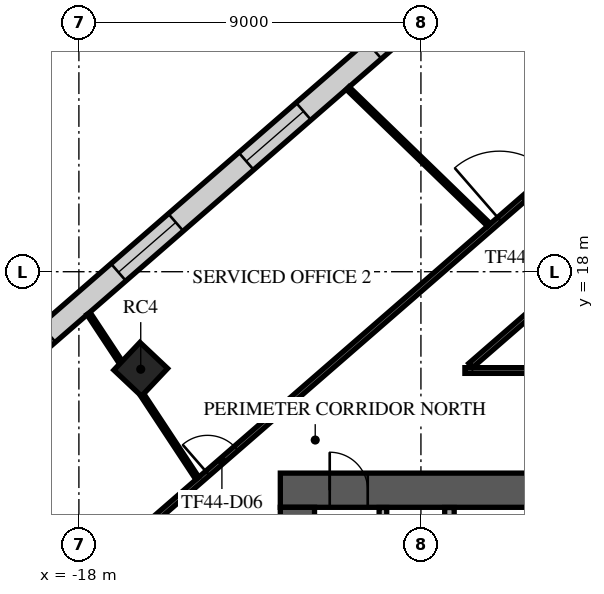
"""IFC4 building model, lengths in metres.
Left out: names, types, materials, properties, quantities, classifications, styles, units other than length and angle.
Written with IfcOpenShell. Run it as: python <this file> out.ifc"""

import sys

from ifc_helpers import new_model, si_unit, direction, frame, frame_2d, origin, origin_2d, place, context, subcontext, project, spatial, rectangle, extrude, element, fill, save


model = new_model("IFC4")
c1 = context("Model", 3, precision=1e-05, world=origin(), true_north=direction((0.0, 1.0)))
c2 = subcontext(c1, "Body", "Model", "MODEL_VIEW")
j1 = project(units=[si_unit("LENGTHUNIT", "METRE"), si_unit("PLANEANGLEUNIT", "RADIAN")], contexts=[c1])
p1 = place(None, origin())
s1 = spatial("IfcSite", under=j1, at=p1, CompositionType="ELEMENT")
p2 = place(p1, origin())
s2 = spatial("IfcBuilding", under=s1, at=p2, CompositionType="ELEMENT")
p3 = place(p2, frame((0.0, 0.0, 189.3)))
s3 = spatial("IfcBuildingStorey", under=s2, at=p3, CompositionType="ELEMENT", Elevation=189.3)
p4 = place(p3, frame((-16.373, 15.433, -0.38), z_axis=(0.0, 0.0, 1.0), x_axis=(0.685916152371, 0.727680583715, 0.0)))
e1 = element("IfcColumn", 1, at=p4, inside=s3, PredefinedType="COLUMN", context=c2, shape_type="SweptSolid", body=[
    extrude(rectangle(XDim=1.0, YDim=1.0, at=origin_2d()), origin(), (0.0, 0.0, 1.0), 4.38),
])
p5 = place(p3, frame((-12.7, 12.25, 0.0), z_axis=(0.0, 0.0, 1.0), x_axis=(1.0, 0.0, 0.0)))
e2 = element("IfcWall", 2, at=p5, inside=s3, PredefinedType="SHEAR", context=c2, shape_type="SweptSolid", body=[
    extrude(rectangle(XDim=25.4, YDim=0.9, at=frame_2d((12.7, 0.0))), origin(), (0.0, 0.0, 1.0), 3.62),
])
p6 = place(p5, frame((11.5, 0.0, 0.0)))
e3 = element("IfcOpeningElement", 3, at=p6, cuts=e2, PredefinedType="OPENING", context=c2, shape_type="SweptSolid", body=[
    extrude(rectangle(XDim=2.4, YDim=2.4, at=frame_2d((1.2, 1.2))), frame((0.0, 0.46, 0.0), z_axis=(0.0, -1.0, 0.0), x_axis=(1.0, 0.0, 0.0)), (0.0, 0.0, 1.0), 0.92),
])
p7 = place(p5, frame((22.325, 0.0, 0.0)))
e4 = element("IfcOpeningElement", 4, at=p7, cuts=e2, PredefinedType="OPENING", context=c2, shape_type="SweptSolid", body=[
    extrude(rectangle(XDim=1.2, YDim=2.1, at=frame_2d((0.6, 1.05))), frame((0.0, 0.46, 0.0), z_axis=(0.0, -1.0, 0.0), x_axis=(1.0, 0.0, 0.0)), (0.0, 0.0, 1.0), 0.92),
])
p8 = place(p5, frame((1.3, 0.0, 0.0)))
e5 = element("IfcOpeningElement", 5, at=p8, cuts=e2, PredefinedType="OPENING", context=c2, shape_type="SweptSolid", body=[
    extrude(rectangle(XDim=1.0, YDim=2.1, at=frame_2d((0.5, 1.05))), frame((0.0, 0.46, 0.0), z_axis=(0.0, -1.0, 0.0), x_axis=(1.0, 0.0, 0.0)), (0.0, 0.0, 1.0), 0.92),
])
p9 = place(p3, frame((-12.25, -11.8, 0.0), z_axis=(0.0, 0.0, 1.0), x_axis=(0.0, 1.0, 0.0)))
e6 = element("IfcWall", 6, at=p9, inside=s3, PredefinedType="SHEAR", context=c2, shape_type="SweptSolid", body=[
    extrude(rectangle(XDim=23.6, YDim=0.9, at=frame_2d((11.8, 0.0))), origin(), (0.0, 0.0, 1.0), 3.62),
])
p10 = place(p9, frame((10.6, 0.0, 0.0)))
e7 = element("IfcOpeningElement", 7, at=p10, cuts=e6, PredefinedType="OPENING", context=c2, shape_type="SweptSolid", body=[
    extrude(rectangle(XDim=2.4, YDim=2.4, at=frame_2d((1.2, 1.2))), frame((0.0, 0.46, 0.0), z_axis=(0.0, -1.0, 0.0), x_axis=(1.0, 0.0, 0.0)), (0.0, 0.0, 1.0), 0.92),
])
p11 = place(p3, frame((-10.0, 4.78, 0.0), z_axis=(0.0, 0.0, 1.0), x_axis=(0.0, 1.0, 0.0)))
e8 = element("IfcWall", 8, at=p11, inside=s3, PredefinedType="PARTITIONING", context=c2, shape_type="SweptSolid", body=[
    extrude(rectangle(XDim=7.015, YDim=0.2, at=frame_2d((3.507, 0.0))), origin(), (0.0, 0.0, 1.0), 3.62),
])
p12 = place(p11, frame((2.92, 0.0, 0.0)))
e9 = element("IfcOpeningElement", 9, at=p12, cuts=e8, PredefinedType="OPENING", context=c2, shape_type="SweptSolid", body=[
    extrude(rectangle(XDim=1.0, YDim=2.1, at=frame_2d((0.5, 1.05))), frame((0.0, 0.11, 0.0), z_axis=(0.0, -1.0, 0.0), x_axis=(1.0, 0.0, 0.0)), (0.0, 0.0, 1.0), 0.22),
])
p13 = place(p3, frame((-8.25, 8.805, 0.0), z_axis=(0.0, 0.0, 1.0), x_axis=(0.0, 1.0, 0.0)))
e10 = element("IfcWall", 10, at=p13, inside=s3, PredefinedType="PARTITIONING", context=c2, shape_type="SweptSolid", body=[
    extrude(rectangle(XDim=2.99, YDim=0.25, at=frame_2d((1.495, 0.0))), origin(), (0.0, 0.0, 1.0), 3.62),
])
p14 = place(p13, frame((0.895, 0.0, 0.0)))
e11 = element("IfcOpeningElement", 11, at=p14, cuts=e10, PredefinedType="OPENING", context=c2, shape_type="SweptSolid", body=[
    extrude(rectangle(XDim=1.0, YDim=2.1, at=frame_2d((0.5, 1.05))), frame((0.0, 0.135, 0.0), z_axis=(0.0, -1.0, 0.0), x_axis=(1.0, 0.0, 0.0)), (0.0, 0.0, 1.0), 0.27),
])
p15 = place(p3, frame((2.286, 34.715, 0.0), z_axis=(0.0, 0.0, 1.0), x_axis=(-0.754708272811, -0.656060532993, 0.0)))
e12 = element("IfcWall", 12, at=p15, inside=s3, PredefinedType="STANDARD", context=c2, shape_type="SweptSolid", body=[
    extrude(rectangle(XDim=49.0, YDim=0.6, at=frame_2d((24.5, 0.0))), origin(), (0.0, 0.0, 1.0), 3.62),
])
p16 = place(p15, frame((1.227, 0.0, 0.9)))
e13 = element("IfcOpeningElement", 13, at=p16, cuts=e12, PredefinedType="OPENING", context=c2, shape_type="SweptSolid", body=[
    extrude(rectangle(XDim=2.0, YDim=2.1, at=frame_2d((1.0, 1.05))), frame((0.0, 0.31, 0.0), z_axis=(0.0, -1.0, 0.0), x_axis=(1.0, 0.0, 0.0)), (0.0, 0.0, 1.0), 0.62),
])
p17 = place(p15, frame((5.682, 0.0, 0.9)))
e14 = element("IfcOpeningElement", 14, at=p17, cuts=e12, PredefinedType="OPENING", context=c2, shape_type="SweptSolid", body=[
    extrude(rectangle(XDim=2.0, YDim=2.1, at=frame_2d((1.0, 1.05))), frame((0.0, 0.31, 0.0), z_axis=(0.0, -1.0, 0.0), x_axis=(1.0, 0.0, 0.0)), (0.0, 0.0, 1.0), 0.62),
])
p18 = place(p15, frame((10.136, 0.0, 0.9)))
e15 = element("IfcOpeningElement", 15, at=p18, cuts=e12, PredefinedType="OPENING", context=c2, shape_type="SweptSolid", body=[
    extrude(rectangle(XDim=2.0, YDim=2.1, at=frame_2d((1.0, 1.05))), frame((0.0, 0.31, 0.0), z_axis=(0.0, -1.0, 0.0), x_axis=(1.0, 0.0, 0.0)), (0.0, 0.0, 1.0), 0.62),
])
p19 = place(p15, frame((14.591, 0.0, 0.9)))
e16 = element("IfcOpeningElement", 16, at=p19, cuts=e12, PredefinedType="OPENING", context=c2, shape_type="SweptSolid", body=[
    extrude(rectangle(XDim=2.0, YDim=2.1, at=frame_2d((1.0, 1.05))), frame((0.0, 0.31, 0.0), z_axis=(0.0, -1.0, 0.0), x_axis=(1.0, 0.0, 0.0)), (0.0, 0.0, 1.0), 0.62),
])
p20 = place(p15, frame((19.045, 0.0, 0.9)))
e17 = element("IfcOpeningElement", 17, at=p20, cuts=e12, PredefinedType="OPENING", context=c2, shape_type="SweptSolid", body=[
    extrude(rectangle(XDim=2.0, YDim=2.1, at=frame_2d((1.0, 1.05))), frame((0.0, 0.31, 0.0), z_axis=(0.0, -1.0, 0.0), x_axis=(1.0, 0.0, 0.0)), (0.0, 0.0, 1.0), 0.62),
])
p21 = place(p15, frame((23.5, 0.0, 0.9)))
e18 = element("IfcOpeningElement", 18, at=p21, cuts=e12, PredefinedType="OPENING", context=c2, shape_type="SweptSolid", body=[
    extrude(rectangle(XDim=2.0, YDim=2.1, at=frame_2d((1.0, 1.05))), frame((0.0, 0.31, 0.0), z_axis=(0.0, -1.0, 0.0), x_axis=(1.0, 0.0, 0.0)), (0.0, 0.0, 1.0), 0.62),
])
p22 = place(p15, frame((27.955, 0.0, 0.9)))
e19 = element("IfcOpeningElement", 19, at=p22, cuts=e12, PredefinedType="OPENING", context=c2, shape_type="SweptSolid", body=[
    extrude(rectangle(XDim=2.0, YDim=2.1, at=frame_2d((1.0, 1.05))), frame((0.0, 0.31, 0.0), z_axis=(0.0, -1.0, 0.0), x_axis=(1.0, 0.0, 0.0)), (0.0, 0.0, 1.0), 0.62),
])
p23 = place(p15, frame((32.409, 0.0, 0.9)))
e20 = element("IfcOpeningElement", 20, at=p23, cuts=e12, PredefinedType="OPENING", context=c2, shape_type="SweptSolid", body=[
    extrude(rectangle(XDim=2.0, YDim=2.1, at=frame_2d((1.0, 1.05))), frame((0.0, 0.31, 0.0), z_axis=(0.0, -1.0, 0.0), x_axis=(1.0, 0.0, 0.0)), (0.0, 0.0, 1.0), 0.62),
])
p24 = place(p15, frame((36.864, 0.0, 0.9)))
e21 = element("IfcOpeningElement", 21, at=p24, cuts=e12, PredefinedType="OPENING", context=c2, shape_type="SweptSolid", body=[
    extrude(rectangle(XDim=2.0, YDim=2.1, at=frame_2d((1.0, 1.05))), frame((0.0, 0.31, 0.0), z_axis=(0.0, -1.0, 0.0), x_axis=(1.0, 0.0, 0.0)), (0.0, 0.0, 1.0), 0.62),
])
p25 = place(p15, frame((41.318, 0.0, 0.9)))
e22 = element("IfcOpeningElement", 22, at=p25, cuts=e12, PredefinedType="OPENING", context=c2, shape_type="SweptSolid", body=[
    extrude(rectangle(XDim=2.0, YDim=2.1, at=frame_2d((1.0, 1.05))), frame((0.0, 0.31, 0.0), z_axis=(0.0, -1.0, 0.0), x_axis=(1.0, 0.0, 0.0)), (0.0, 0.0, 1.0), 0.62),
])
p26 = place(p15, frame((45.773, 0.0, 0.9)))
e23 = element("IfcOpeningElement", 23, at=p26, cuts=e12, PredefinedType="OPENING", context=c2, shape_type="SweptSolid", body=[
    extrude(rectangle(XDim=2.0, YDim=2.1, at=frame_2d((1.0, 1.05))), frame((0.0, 0.31, 0.0), z_axis=(0.0, -1.0, 0.0), x_axis=(1.0, 0.0, 0.0)), (0.0, 0.0, 1.0), 0.62),
])
p27 = place(p3, frame((-26.208, 2.616, 0.0), z_axis=(0.0, 0.0, 1.0), x_axis=(0.754710701231, 0.656057739416, 0.0)))
e24 = element("IfcWall", 24, at=p27, inside=s3, PredefinedType="PARTITIONING", context=c2, shape_type="SweptSolid", body=[
    extrude(rectangle(XDim=36.126, YDim=0.15, at=frame_2d((18.063, 0.0))), origin(), (0.0, 0.0, 1.0), 3.17),
])
p28 = place(p27, frame((2.551, 0.0, 0.0)))
e25 = element("IfcOpeningElement", 25, at=p28, cuts=e24, PredefinedType="OPENING", context=c2, shape_type="SweptSolid", body=[
    extrude(rectangle(XDim=1.0, YDim=2.1, at=frame_2d((0.5, 1.05))), frame((0.0, 0.085, 0.0), z_axis=(0.0, -1.0, 0.0), x_axis=(1.0, 0.0, 0.0)), (0.0, 0.0, 1.0), 0.17),
])
p29 = place(p27, frame((15.362, 0.0, 0.0)))
e26 = element("IfcOpeningElement", 26, at=p29, cuts=e24, PredefinedType="OPENING", context=c2, shape_type="SweptSolid", body=[
    extrude(rectangle(XDim=1.0, YDim=2.1, at=frame_2d((0.5, 1.05))), frame((0.0, 0.085, 0.0), z_axis=(0.0, -1.0, 0.0), x_axis=(1.0, 0.0, 0.0)), (0.0, 0.0, 1.0), 0.17),
])
p30 = place(p27, frame((25.542, 0.0, 0.0)))
e27 = element("IfcOpeningElement", 27, at=p30, cuts=e24, PredefinedType="OPENING", context=c2, shape_type="SweptSolid", body=[
    extrude(rectangle(XDim=1.8, YDim=2.1, at=frame_2d((0.9, 1.05))), frame((0.0, 0.085, 0.0), z_axis=(0.0, -1.0, 0.0), x_axis=(1.0, 0.0, 0.0)), (0.0, 0.0, 1.0), 0.17),
])
p31 = place(p3, frame((-7.843, 15.4, 0.0), z_axis=(0.0, 0.0, 1.0), x_axis=(1.0, 0.0, 0.0)))
e28 = element("IfcWall", 28, at=p31, inside=s3, PredefinedType="PARTITIONING", context=c2, shape_type="SweptSolid", body=[
    extrude(rectangle(XDim=20.318, YDim=0.15, at=frame_2d((10.159, 0.0))), origin(), (0.0, 0.0, 1.0), 3.17),
])
p32 = place(p31, frame((9.55, 0.0, 0.0)))
e29 = element("IfcOpeningElement", 29, at=p32, cuts=e28, PredefinedType="OPENING", context=c2, shape_type="SweptSolid", body=[
    extrude(rectangle(XDim=1.0, YDim=2.1, at=frame_2d((0.5, 1.05))), frame((0.0, 0.085, 0.0), z_axis=(0.0, -1.0, 0.0), x_axis=(1.0, 0.0, 0.0)), (0.0, 0.0, 1.0), 0.17),
])
p33 = place(p3, frame((-7.692, 15.531, 0.0), z_axis=(0.0, 0.0, 1.0), x_axis=(0.754705202017, 0.656064065506, 0.0)))
e30 = element("IfcWall", 30, at=p33, inside=s3, PredefinedType="PARTITIONING", context=c2, shape_type="SweptSolid", body=[
    extrude(rectangle(XDim=13.603, YDim=0.15, at=frame_2d((6.801, 0.0))), origin(), (0.0, 0.0, 1.0), 3.17),
])
p34 = place(p3, frame((-17.747, 16.901, 0.0), z_axis=(0.0, 0.0, 1.0), x_axis=(0.550725721205, -0.834686276396, 0.0)))
e31 = element("IfcWall", 31, at=p34, inside=s3, PredefinedType="PARTITIONING", context=c2, shape_type="SweptSolid", body=[
    extrude(rectangle(XDim=1.548, YDim=0.1, at=frame_2d((0.774, 0.0))), origin(), (0.0, 0.0, 1.0), 3.62),
])
p35 = place(p3, frame((-16.328, 14.751, 0.0), z_axis=(0.0, 0.0, 1.0), x_axis=(0.550713616712, -0.83469426281, 0.0)))
e32 = element("IfcWall", 32, at=p35, inside=s3, PredefinedType="PARTITIONING", context=c2, shape_type="SweptSolid", body=[
    extrude(rectangle(XDim=2.619, YDim=0.1, at=frame_2d((1.309, 0.0))), origin(), (0.0, 0.0, 1.0), 3.17),
])
p36 = place(p3, frame((-10.926, 22.83, 0.0), z_axis=(0.0, 0.0, 1.0), x_axis=(0.718303647436, -0.695729739252, 0.0)))
e33 = element("IfcWall", 33, at=p36, inside=s3, PredefinedType="PARTITIONING", context=c2, shape_type="SweptSolid", body=[
    extrude(rectangle(XDim=5.17, YDim=0.1, at=frame_2d((2.585, 0.0))), origin(), (0.0, 0.0, 1.0), 3.17),
])
p37 = place(p8, origin())
e34 = element("IfcDoor", 34, at=p37, inside=s3, OperationType="SINGLE_SWING_LEFT", PredefinedType="DOOR", context=c2, shape_type="SweptSolid", body=[
    extrude(rectangle(XDim=1.0, YDim=2.1, at=frame_2d((0.5, 1.05))), frame((0.0, 0.025, 0.0), z_axis=(0.0, -1.0, 0.0), x_axis=(1.0, 0.0, 0.0)), (0.0, 0.0, 1.0), 0.05),
])
fill(e5, e34)
p38 = place(p20, origin())
e35 = element("IfcWindow", 35, at=p38, inside=s3, PartitioningType="SINGLE_PANEL", PredefinedType="WINDOW", context=c2, shape_type="SweptSolid", body=[
    extrude(rectangle(XDim=2.0, YDim=2.1, at=frame_2d((1.0, 1.05))), frame((0.0, 0.03, 0.0), z_axis=(0.0, -1.0, 0.0), x_axis=(1.0, 0.0, 0.0)), (0.0, 0.0, 1.0), 0.06),
])
fill(e17, e35)
p39 = place(p21, origin())
e36 = element("IfcWindow", 36, at=p39, inside=s3, PartitioningType="SINGLE_PANEL", PredefinedType="WINDOW", context=c2, shape_type="SweptSolid", body=[
    extrude(rectangle(XDim=2.0, YDim=2.1, at=frame_2d((1.0, 1.05))), frame((0.0, 0.03, 0.0), z_axis=(0.0, -1.0, 0.0), x_axis=(1.0, 0.0, 0.0)), (0.0, 0.0, 1.0), 0.06),
])
fill(e18, e36)
p40 = place(p29, origin())
e37 = element("IfcDoor", 37, at=p40, inside=s3, OperationType="SINGLE_SWING_RIGHT", PredefinedType="DOOR", context=c2, shape_type="SweptSolid", body=[
    extrude(rectangle(XDim=1.0, YDim=2.1, at=frame_2d((0.5, 1.05))), frame((0.0, 0.025, 0.0), z_axis=(0.0, -1.0, 0.0), x_axis=(1.0, 0.0, 0.0)), (0.0, 0.0, 1.0), 0.05),
])
fill(e26, e37)
p41 = place(p30, origin())
e38 = element("IfcDoor", 38, at=p41, inside=s3, OperationType="DOUBLE_DOOR_SINGLE_SWING", PredefinedType="DOOR", context=c2, shape_type="SweptSolid", body=[
    extrude(rectangle(XDim=1.8, YDim=2.1, at=frame_2d((0.9, 1.05))), frame((0.0, 0.025, 0.0), z_axis=(0.0, -1.0, 0.0), x_axis=(1.0, 0.0, 0.0)), (0.0, 0.0, 1.0), 0.05),
])
fill(e27, e38)
save(model, sys.argv[1])
